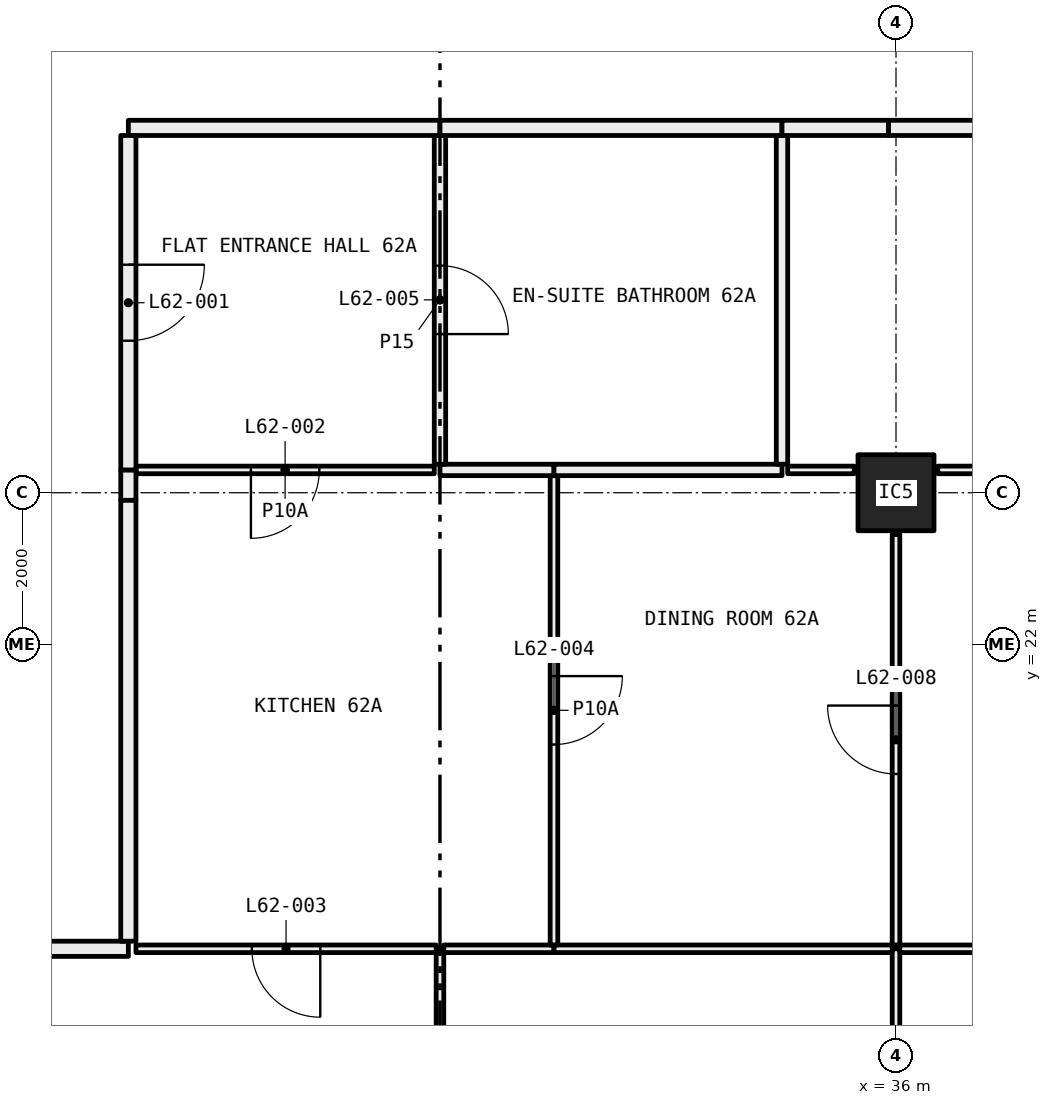
"""IFC4 building model, lengths in metres.
Left out: names, types, materials, properties, quantities, classifications, styles, units other than length and angle.
Written with IfcOpenShell. Run it as: python <this file> out.ifc"""

import sys

from ifc_helpers import new_model, si_unit, direction, frame, frame_2d, origin, origin_2d, place, context, subcontext, project, spatial, rectangle, hollow_rectangle, extrude, element, fill, save


model = new_model("IFC4")
c1 = context("Model", 3, precision=1e-05, world=origin(), true_north=direction((0.0, 1.0)))
c2 = subcontext(c1, "Body", "Model", "MODEL_VIEW")
j1 = project(units=[si_unit("LENGTHUNIT", "METRE"), si_unit("PLANEANGLEUNIT", "RADIAN")], contexts=[c1])
p1 = place(None, origin())
s1 = spatial("IfcSite", under=j1, at=p1, CompositionType="ELEMENT")
p2 = place(p1, origin())
s2 = spatial("IfcBuilding", under=s1, at=p2, CompositionType="ELEMENT")
p3 = place(p2, frame((0.0, 0.0, 231.75)))
s3 = spatial("IfcBuildingStorey", under=s2, at=p3, CompositionType="ELEMENT", Elevation=231.75)
p4 = place(p3, frame((36.0, 24.0, 0.0), z_axis=(0.0, 0.0, 1.0), x_axis=(1.0, 0.0, 0.0)))
e1 = element("IfcColumn", 1, at=p4, inside=s3, PredefinedType="COLUMN", context=c2, shape_type="SweptSolid", body=[
    extrude(hollow_rectangle(XDim=1.0, YDim=1.0, WallThickness=0.04, at=origin_2d()), origin(), (0.0, 0.0, 1.0), 3.05),
])
p5 = place(p3, frame((30.0, 12.72, 0.0), z_axis=(0.0, 0.0, 1.0), x_axis=(0.0, 1.0, 0.0)))
e2 = element("IfcWall", 2, at=p5, inside=s3, PredefinedType="PARTITIONING", context=c2, shape_type="SweptSolid", body=[
    extrude(rectangle(XDim=5.28, YDim=0.1, at=frame_2d((2.64, 0.0))), origin(), (0.0, 0.0, 1.0), 3.05),
])
p6 = place(p5, frame((2.19, 0.0, 0.0)))
e3 = element("IfcOpeningElement", 3, at=p6, cuts=e2, PredefinedType="OPENING", context=c2, shape_type="SweptSolid", body=[
    extrude(rectangle(XDim=0.9, YDim=2.1, at=frame_2d((0.45, 1.05))), frame((0.0, 0.06, 0.0), z_axis=(0.0, -1.0, 0.0), x_axis=(1.0, 0.0, 0.0)), (0.0, 0.0, 1.0), 0.12),
])
p7 = place(p3, frame((29.95, 18.0, 0.0), z_axis=(0.0, 0.0, 1.0), x_axis=(-1.0, 0.0, 0.0)))
e4 = element("IfcWall", 4, at=p7, inside=s3, PredefinedType="PARTITIONING", context=c2, shape_type="SweptSolid", body=[
    extrude(rectangle(XDim=3.95, YDim=0.1, at=frame_2d((1.975, 0.0))), origin(), (0.0, 0.0, 1.0), 3.05),
])
p8 = place(p7, frame((1.525, 0.0, 0.0)))
e5 = element("IfcOpeningElement", 5, at=p8, cuts=e4, PredefinedType="OPENING", context=c2, shape_type="SweptSolid", body=[
    extrude(rectangle(XDim=0.9, YDim=2.1, at=frame_2d((0.45, 1.05))), frame((0.0, 0.06, 0.0), z_axis=(0.0, -1.0, 0.0), x_axis=(1.0, 0.0, 0.0)), (0.0, 0.0, 1.0), 0.12),
])
p9 = place(p3, frame((25.9, 18.0, 0.0), z_axis=(0.0, 0.0, 1.0), x_axis=(-1.0, 0.0, 0.0)))
e6 = element("IfcWall", 6, at=p9, inside=s3, PredefinedType="PARTITIONING", context=c2, shape_type="SweptSolid", body=[
    extrude(rectangle(XDim=1.9, YDim=0.2, at=frame_2d((0.95, 0.0))), origin(), (0.0, 0.0, 1.0), 3.05),
])
p10 = place(p3, frame((36.0, 12.72, 0.0), z_axis=(0.0, 0.0, 1.0), x_axis=(0.0, 1.0, 0.0)))
e7 = element("IfcWall", 7, at=p10, inside=s3, PredefinedType="PARTITIONING", context=c2, shape_type="SweptSolid", body=[
    extrude(rectangle(XDim=5.28, YDim=0.1, at=frame_2d((2.64, 0.0))), origin(), (0.0, 0.0, 1.0), 2.45),
])
p11 = place(p3, frame((31.5, 18.0, 0.0), z_axis=(0.0, 0.0, 1.0), x_axis=(-1.0, 0.0, 0.0)))
e8 = element("IfcWall", 8, at=p11, inside=s3, PredefinedType="PARTITIONING", context=c2, shape_type="SweptSolid", body=[
    extrude(rectangle(XDim=1.45, YDim=0.1, at=frame_2d((0.725, 0.0))), origin(), (0.0, 0.0, 1.0), 3.05),
])
p12 = place(p3, frame((35.95, 18.0, 0.0), z_axis=(0.0, 0.0, 1.0), x_axis=(-1.0, 0.0, 0.0)))
e9 = element("IfcWall", 9, at=p12, inside=s3, PredefinedType="PARTITIONING", context=c2, shape_type="SweptSolid", body=[
    extrude(rectangle(XDim=4.45, YDim=0.1, at=frame_2d((2.225, 0.0))), origin(), (0.0, 0.0, 1.0), 2.45),
])
p13 = place(p3, frame((41.925, 18.0, 0.0), z_axis=(0.0, 0.0, 1.0), x_axis=(-1.0, 0.0, 0.0)))
e10 = element("IfcWall", 10, at=p13, inside=s3, PredefinedType="PARTITIONING", context=c2, shape_type="SweptSolid", body=[
    extrude(rectangle(XDim=5.875, YDim=0.1, at=frame_2d((2.938, 0.0))), origin(), (0.0, 0.0, 1.0), 2.45),
])
p14 = place(p13, frame((2.488, 0.0, 0.0)))
e11 = element("IfcOpeningElement", 11, at=p14, cuts=e10, PredefinedType="OPENING", context=c2, shape_type="SweptSolid", body=[
    extrude(rectangle(XDim=0.9, YDim=2.1, at=frame_2d((0.45, 1.05))), frame((0.0, 0.06, 0.0), z_axis=(0.0, -1.0, 0.0), x_axis=(1.0, 0.0, 0.0)), (0.0, 0.0, 1.0), 0.12),
])
p15 = place(p3, frame((31.5, 18.05, 0.0), z_axis=(0.0, 0.0, 1.0), x_axis=(0.0, 1.0, 0.0)))
e12 = element("IfcWall", 12, at=p15, inside=s3, PredefinedType="PARTITIONING", context=c2, shape_type="SweptSolid", body=[
    extrude(rectangle(XDim=6.175, YDim=0.1, at=frame_2d((3.087, 0.0))), origin(), (0.0, 0.0, 1.0), 2.45),
])
p16 = place(p15, frame((2.637, 0.0, 0.0)))
e13 = element("IfcOpeningElement", 13, at=p16, cuts=e12, PredefinedType="OPENING", context=c2, shape_type="SweptSolid", body=[
    extrude(rectangle(XDim=0.9, YDim=2.1, at=frame_2d((0.45, 1.05))), frame((0.0, 0.06, 0.0), z_axis=(0.0, -1.0, 0.0), x_axis=(1.0, 0.0, 0.0)), (0.0, 0.0, 1.0), 0.12),
])
p17 = place(p3, frame((29.925, 24.3, 0.0), z_axis=(0.0, 0.0, 1.0), x_axis=(-1.0, 0.0, 0.0)))
e14 = element("IfcWall", 14, at=p17, inside=s3, PredefinedType="PARTITIONING", context=c2, shape_type="SweptSolid", body=[
    extrude(rectangle(XDim=3.925, YDim=0.1, at=frame_2d((1.962, 0.0))), origin(), (0.0, 0.0, 1.0), 3.05),
])
p18 = place(p17, frame((1.512, 0.0, 0.0)))
e15 = element("IfcOpeningElement", 15, at=p18, cuts=e14, PredefinedType="OPENING", context=c2, shape_type="SweptSolid", body=[
    extrude(rectangle(XDim=0.9, YDim=2.1, at=frame_2d((0.45, 1.05))), frame((0.0, 0.06, 0.0), z_axis=(0.0, -1.0, 0.0), x_axis=(1.0, 0.0, 0.0)), (0.0, 0.0, 1.0), 0.12),
])
p19 = place(p3, frame((31.5, 24.3, 0.0), z_axis=(0.0, 0.0, 1.0), x_axis=(-1.0, 0.0, 0.0)))
e16 = element("IfcWall", 16, at=p19, inside=s3, PredefinedType="PARTITIONING", context=c2, shape_type="SweptSolid", body=[
    extrude(rectangle(XDim=1.5, YDim=0.15, at=frame_2d((0.75, 0.0))), origin(), (0.0, 0.0, 1.0), 3.05),
])
p20 = place(p3, frame((25.9, 24.3, 0.0), z_axis=(0.0, 0.0, 1.0), x_axis=(0.0, -1.0, 0.0)))
e17 = element("IfcWall", 17, at=p20, inside=s3, PredefinedType="PARTITIONING", context=c2, shape_type="SweptSolid", body=[
    extrude(rectangle(XDim=0.4, YDim=0.2, at=frame_2d((0.2, 0.0))), origin(), (0.0, 0.0, 1.0), 2.45),
])
p21 = place(p3, frame((25.9, 23.9, 0.0), z_axis=(0.0, 0.0, 1.0), x_axis=(0.0, -1.0, 0.0)))
e18 = element("IfcWall", 18, at=p21, inside=s3, PredefinedType="PARTITIONING", context=c2, shape_type="SweptSolid", body=[
    extrude(rectangle(XDim=5.8, YDim=0.2, at=frame_2d((2.9, 0.0))), origin(), (0.0, 0.0, 1.0), 3.05),
])
p22 = place(p3, frame((36.0, 18.05, 0.0), z_axis=(0.0, 0.0, 1.0), x_axis=(0.0, 1.0, 0.0)))
e19 = element("IfcWall", 19, at=p22, inside=s3, PredefinedType="PARTITIONING", context=c2, shape_type="SweptSolid", body=[
    extrude(rectangle(XDim=5.4, YDim=0.1, at=frame_2d((2.7, 0.0))), origin(), (0.0, 0.0, 1.0), 2.45),
])
p23 = place(p22, frame((2.25, 0.0, 0.0)))
e20 = element("IfcOpeningElement", 20, at=p23, cuts=e19, PredefinedType="OPENING", context=c2, shape_type="SweptSolid", body=[
    extrude(rectangle(XDim=0.9, YDim=2.1, at=frame_2d((0.45, 1.05))), frame((0.0, 0.06, 0.0), z_axis=(0.0, -1.0, 0.0), x_axis=(1.0, 0.0, 0.0)), (0.0, 0.0, 1.0), 0.12),
])
p24 = place(p3, frame((34.5, 24.3, 0.0), z_axis=(0.0, 0.0, 1.0), x_axis=(-1.0, 0.0, 0.0)))
e21 = element("IfcWall", 21, at=p24, inside=s3, PredefinedType="PARTITIONING", context=c2, shape_type="SweptSolid", body=[
    extrude(rectangle(XDim=3.0, YDim=0.15, at=frame_2d((1.5, 0.0))), origin(), (0.0, 0.0, 1.0), 3.05),
])
p25 = place(p3, frame((35.45, 24.3, 0.0), z_axis=(0.0, 0.0, 1.0), x_axis=(-1.0, 0.0, 0.0)))
e22 = element("IfcWall", 22, at=p25, inside=s3, PredefinedType="PARTITIONING", context=c2, shape_type="SweptSolid", body=[
    extrude(rectangle(XDim=0.875, YDim=0.1, at=frame_2d((0.438, 0.0))), origin(), (0.0, 0.0, 1.0), 3.05),
])
p26 = place(p3, frame((44.925, 24.3, 0.0), z_axis=(0.0, 0.0, 1.0), x_axis=(-1.0, 0.0, 0.0)))
e23 = element("IfcWall", 23, at=p26, inside=s3, PredefinedType="PARTITIONING", context=c2, shape_type="SweptSolid", body=[
    extrude(rectangle(XDim=8.375, YDim=0.1, at=frame_2d((4.188, 0.0))), origin(), (0.0, 0.0, 1.0), 3.05),
])
p27 = place(p26, frame((3.738, 0.0, 0.0)))
e24 = element("IfcOpeningElement", 24, at=p27, cuts=e23, PredefinedType="OPENING", context=c2, shape_type="SweptSolid", body=[
    extrude(rectangle(XDim=0.9, YDim=2.1, at=frame_2d((0.45, 1.05))), frame((0.0, 0.06, 0.0), z_axis=(0.0, -1.0, 0.0), x_axis=(1.0, 0.0, 0.0)), (0.0, 0.0, 1.0), 0.12),
])
p28 = place(p3, frame((30.0, 24.375, 0.0), z_axis=(0.0, 0.0, 1.0), x_axis=(0.0, 1.0, 0.0)))
e25 = element("IfcWall", 25, at=p28, inside=s3, PredefinedType="PARTITIONING", context=c2, shape_type="SweptSolid", body=[
    extrude(rectangle(XDim=4.325, YDim=0.15, at=frame_2d((2.163, 0.0))), origin(), (0.0, 0.0, 1.0), 3.05),
])
p29 = place(p28, frame((1.712, 0.0, 0.0)))
e26 = element("IfcOpeningElement", 26, at=p29, cuts=e25, PredefinedType="OPENING", context=c2, shape_type="SweptSolid", body=[
    extrude(rectangle(XDim=0.9, YDim=2.1, at=frame_2d((0.45, 1.05))), frame((0.0, 0.085, 0.0), z_axis=(0.0, -1.0, 0.0), x_axis=(1.0, 0.0, 0.0)), (0.0, 0.0, 1.0), 0.17),
])
p30 = place(p3, frame((30.0, 28.8, 0.0), z_axis=(0.0, 0.0, 1.0), x_axis=(-1.0, 0.0, 0.0)))
e27 = element("IfcWall", 27, at=p30, inside=s3, PredefinedType="PARTITIONING", context=c2, shape_type="SweptSolid", body=[
    extrude(rectangle(XDim=4.1, YDim=0.2, at=frame_2d((2.05, 0.0))), origin(), (0.0, 0.0, 1.0), 3.05),
])
p31 = place(p3, frame((25.9, 28.7, 0.0), z_axis=(0.0, 0.0, 1.0), x_axis=(0.0, -1.0, 0.0)))
e28 = element("IfcWall", 28, at=p31, inside=s3, PredefinedType="PARTITIONING", context=c2, shape_type="SweptSolid", body=[
    extrude(rectangle(XDim=4.4, YDim=0.2, at=frame_2d((2.2, 0.0))), origin(), (0.0, 0.0, 1.0), 3.05),
])
p32 = place(p31, frame((1.7, 0.0, 0.0)))
e29 = element("IfcOpeningElement", 29, at=p32, cuts=e28, PredefinedType="OPENING", context=c2, shape_type="SweptSolid", body=[
    extrude(rectangle(XDim=1.0, YDim=2.1, at=frame_2d((0.5, 1.05))), frame((0.0, 0.11, 0.0), z_axis=(0.0, -1.0, 0.0), x_axis=(1.0, 0.0, 0.0)), (0.0, 0.0, 1.0), 0.22),
])
p33 = place(p3, frame((34.5, 24.375, 0.0), z_axis=(0.0, 0.0, 1.0), x_axis=(0.0, 1.0, 0.0)))
e30 = element("IfcWall", 30, at=p33, inside=s3, PredefinedType="PARTITIONING", context=c2, shape_type="SweptSolid", body=[
    extrude(rectangle(XDim=4.325, YDim=0.15, at=frame_2d((2.163, 0.0))), origin(), (0.0, 0.0, 1.0), 3.05),
])
p34 = place(p3, frame((34.5, 28.8, 0.0), z_axis=(0.0, 0.0, 1.0), x_axis=(-1.0, 0.0, 0.0)))
e31 = element("IfcWall", 31, at=p34, inside=s3, PredefinedType="PARTITIONING", context=c2, shape_type="SweptSolid", body=[
    extrude(rectangle(XDim=4.5, YDim=0.2, at=frame_2d((2.25, 0.0))), origin(), (0.0, 0.0, 1.0), 3.05),
])
p35 = place(p3, frame((45.0, 28.8, 0.0), z_axis=(0.0, 0.0, 1.0), x_axis=(-1.0, 0.0, 0.0)))
e32 = element("IfcWall", 32, at=p35, inside=s3, PredefinedType="PARTITIONING", context=c2, shape_type="SweptSolid", body=[
    extrude(rectangle(XDim=9.1, YDim=0.2, at=frame_2d((4.55, 0.0))), origin(), (0.0, 0.0, 1.0), 2.45),
])
p36 = place(p3, frame((35.9, 28.8, 0.0), z_axis=(0.0, 0.0, 1.0), x_axis=(-1.0, 0.0, 0.0)))
e33 = element("IfcWall", 33, at=p36, inside=s3, PredefinedType="PARTITIONING", context=c2, shape_type="SweptSolid", body=[
    extrude(rectangle(XDim=1.4, YDim=0.2, at=frame_2d((0.7, 0.0))), origin(), (0.0, 0.0, 1.0), 3.05),
])
p37 = place(p32, origin())
e34 = element("IfcDoor", 34, at=p37, inside=s3, OperationType="SINGLE_SWING_RIGHT", PredefinedType="DOOR", context=c2, shape_type="SweptSolid", body=[
    extrude(rectangle(XDim=1.0, YDim=2.1, at=frame_2d((0.5, 1.05))), frame((0.0, 0.025, 0.0), z_axis=(0.0, -1.0, 0.0), x_axis=(1.0, 0.0, 0.0)), (0.0, 0.0, 1.0), 0.05),
])
fill(e29, e34)
p38 = place(p18, origin())
e35 = element("IfcDoor", 35, at=p38, inside=s3, OperationType="SINGLE_SWING_LEFT", PredefinedType="DOOR", context=c2, shape_type="SweptSolid", body=[
    extrude(rectangle(XDim=0.9, YDim=2.1, at=frame_2d((0.45, 1.05))), frame((0.0, 0.025, 0.0), z_axis=(0.0, -1.0, 0.0), x_axis=(1.0, 0.0, 0.0)), (0.0, 0.0, 1.0), 0.05),
])
fill(e15, e35)
p39 = place(p8, origin())
e36 = element("IfcDoor", 36, at=p39, inside=s3, OperationType="SINGLE_SWING_RIGHT", PredefinedType="DOOR", context=c2, shape_type="SweptSolid", body=[
    extrude(rectangle(XDim=0.9, YDim=2.1, at=frame_2d((0.45, 1.05))), frame((0.0, 0.025, 0.0), z_axis=(0.0, -1.0, 0.0), x_axis=(1.0, 0.0, 0.0)), (0.0, 0.0, 1.0), 0.05),
])
fill(e5, e36)
p40 = place(p16, frame((0.9, 0.0, 0.0), x_axis=(-1.0, 0.0, 0.0)))
e37 = element("IfcDoor", 37, at=p40, inside=s3, OperationType="SINGLE_SWING_RIGHT", PredefinedType="DOOR", context=c2, shape_type="SweptSolid", body=[
    extrude(rectangle(XDim=0.9, YDim=2.1, at=frame_2d((0.45, 1.05))), frame((0.0, 0.025, 0.0), z_axis=(0.0, -1.0, 0.0), x_axis=(1.0, 0.0, 0.0)), (0.0, 0.0, 1.0), 0.05),
])
fill(e13, e37)
p41 = place(p29, frame((0.9, 0.0, 0.0), x_axis=(-1.0, 0.0, 0.0)))
e38 = element("IfcDoor", 38, at=p41, inside=s3, OperationType="SINGLE_SWING_LEFT", PredefinedType="DOOR", context=c2, shape_type="SweptSolid", body=[
    extrude(rectangle(XDim=0.9, YDim=2.1, at=frame_2d((0.45, 1.05))), frame((0.0, 0.025, 0.0), z_axis=(0.0, -1.0, 0.0), x_axis=(1.0, 0.0, 0.0)), (0.0, 0.0, 1.0), 0.05),
])
fill(e26, e38)
p42 = place(p23, origin())
e39 = element("IfcDoor", 39, at=p42, inside=s3, OperationType="SINGLE_SWING_LEFT", PredefinedType="DOOR", context=c2, shape_type="SweptSolid", body=[
    extrude(rectangle(XDim=0.9, YDim=2.1, at=frame_2d((0.45, 1.05))), frame((0.0, 0.025, 0.0), z_axis=(0.0, -1.0, 0.0), x_axis=(1.0, 0.0, 0.0)), (0.0, 0.0, 1.0), 0.05),
])
fill(e20, e39)
save(model, sys.argv[1])
